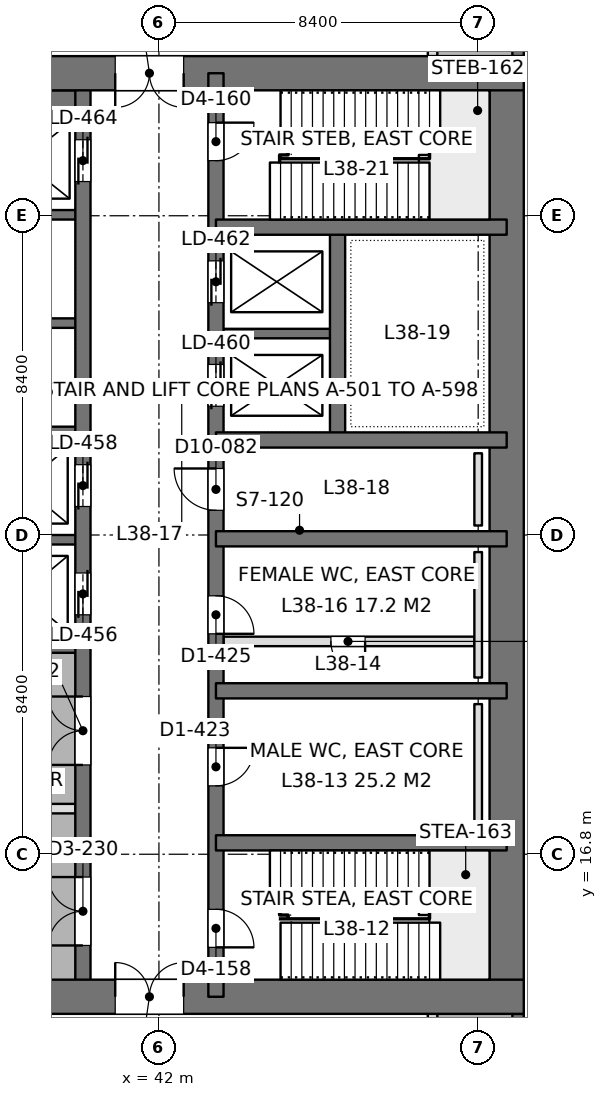
"""IFC4 building model, lengths in metres.
Left out: names, types, materials, properties, quantities, classifications, styles, units other than length and angle.
Written with IfcOpenShell. Run it as: python <this file> out.ifc"""

import sys

from ifc_helpers import new_model, si_unit, direction, frame, frame_2d, origin, place, context, subcontext, project, spatial, rectangle, extrude, element, fill, save


model = new_model("IFC4")
c1 = context("Model", 3, precision=1e-05, world=origin(), true_north=direction((0.0, 1.0)))
c2 = subcontext(c1, "Body", "Model", "MODEL_VIEW")
j1 = project(units=[si_unit("LENGTHUNIT", "METRE"), si_unit("PLANEANGLEUNIT", "RADIAN")], contexts=[c1])
p1 = place(None, origin())
s1 = spatial("IfcSite", under=j1, at=p1, CompositionType="ELEMENT")
p2 = place(p1, origin())
s2 = spatial("IfcBuilding", under=s1, at=p2, CompositionType="ELEMENT")
p3 = place(p2, frame((0.0, 0.0, 168.0)))
s3 = spatial("IfcBuildingStorey", under=s2, at=p3, CompositionType="ELEMENT", Elevation=168.0)
p4 = place(p3, frame((33.6, 13.05, 0.0), z_axis=(0.0, 0.0, 1.0), x_axis=(1.0, 0.0, 0.0)))
e1 = element("IfcWall", 1, at=p4, inside=s3, PredefinedType="SHEAR", context=c2, shape_type="SweptSolid", body=[
    extrude(rectangle(XDim=18.0, YDim=0.9, at=frame_2d((9.0, 0.0))), origin(), (0.0, 0.0, 1.0), 5.4),
])
p5 = place(p4, frame((7.25, 0.0, 0.0)))
e2 = element("IfcOpeningElement", 2, at=p5, cuts=e1, PredefinedType="OPENING", context=c2, shape_type="SweptSolid", body=[
    extrude(rectangle(XDim=1.8, YDim=2.4, at=frame_2d((0.9, 1.2))), frame((0.0, 0.46, 0.0), z_axis=(0.0, -1.0, 0.0), x_axis=(1.0, 0.0, 0.0)), (0.0, 0.0, 1.0), 0.92),
])
p6 = place(p3, frame((33.6, 37.35, 0.0), z_axis=(0.0, 0.0, 1.0), x_axis=(1.0, 0.0, 0.0)))
e3 = element("IfcWall", 3, at=p6, inside=s3, PredefinedType="SHEAR", context=c2, shape_type="SweptSolid", body=[
    extrude(rectangle(XDim=18.0, YDim=0.9, at=frame_2d((9.0, 0.0))), origin(), (0.0, 0.0, 1.0), 5.4),
])
p7 = place(p6, frame((7.25, 0.0, 0.0)))
e4 = element("IfcOpeningElement", 4, at=p7, cuts=e3, PredefinedType="OPENING", context=c2, shape_type="SweptSolid", body=[
    extrude(rectangle(XDim=1.8, YDim=2.4, at=frame_2d((0.9, 1.2))), frame((0.0, 0.46, 0.0), z_axis=(0.0, -1.0, 0.0), x_axis=(1.0, 0.0, 0.0)), (0.0, 0.0, 1.0), 0.92),
])
p8 = place(p3, frame((51.15, 13.05, 0.0), z_axis=(0.0, 0.0, 1.0), x_axis=(0.0, 1.0, 0.0)))
e5 = element("IfcWall", 5, at=p8, inside=s3, PredefinedType="SHEAR", context=c2, shape_type="SweptSolid", body=[
    extrude(rectangle(XDim=24.3, YDim=0.9, at=frame_2d((12.15, 0.0))), origin(), (0.0, 0.0, 1.0), 5.4),
])
p9 = place(p3, frame((43.5, 13.05, 0.0), z_axis=(0.0, 0.0, 1.0), x_axis=(0.0, 1.0, 0.0)))
e6 = element("IfcWall", 6, at=p9, inside=s3, PredefinedType="SHEAR", context=c2, shape_type="SweptSolid", body=[
    extrude(rectangle(XDim=24.3, YDim=0.4, at=frame_2d((12.15, 0.0))), origin(), (0.0, 0.0, 1.0), 5.4),
])
p10 = place(p9, frame((1.3, 0.0, 0.0)))
e7 = element("IfcOpeningElement", 7, at=p10, cuts=e6, PredefinedType="OPENING", context=c2, shape_type="SweptSolid", body=[
    extrude(rectangle(XDim=1.0, YDim=2.2, at=frame_2d((0.5, 1.1))), frame((0.0, 0.21, 0.0), z_axis=(0.0, -1.0, 0.0), x_axis=(1.0, 0.0, 0.0)), (0.0, 0.0, 1.0), 0.42),
])
p11 = place(p9, frame((22.0, 0.0, 0.0)))
e8 = element("IfcOpeningElement", 8, at=p11, cuts=e6, PredefinedType="OPENING", context=c2, shape_type="SweptSolid", body=[
    extrude(rectangle(XDim=1.0, YDim=2.2, at=frame_2d((0.5, 1.1))), frame((0.0, 0.21, 0.0), z_axis=(0.0, -1.0, 0.0), x_axis=(1.0, 0.0, 0.0)), (0.0, 0.0, 1.0), 0.42),
])
p12 = place(p9, frame((5.55, 0.0, 0.0)))
e9 = element("IfcOpeningElement", 9, at=p12, cuts=e6, PredefinedType="OPENING", context=c2, shape_type="SweptSolid", body=[
    extrude(rectangle(XDim=1.0, YDim=2.2, at=frame_2d((0.5, 1.1))), frame((0.0, 0.21, 0.0), z_axis=(0.0, -1.0, 0.0), x_axis=(1.0, 0.0, 0.0)), (0.0, 0.0, 1.0), 0.42),
])
p13 = place(p9, frame((9.55, 0.0, 0.0)))
e10 = element("IfcOpeningElement", 10, at=p13, cuts=e6, PredefinedType="OPENING", context=c2, shape_type="SweptSolid", body=[
    extrude(rectangle(XDim=1.0, YDim=2.2, at=frame_2d((0.5, 1.1))), frame((0.0, 0.21, 0.0), z_axis=(0.0, -1.0, 0.0), x_axis=(1.0, 0.0, 0.0)), (0.0, 0.0, 1.0), 0.42),
])
p14 = place(p9, frame((12.8, 0.0, 0.0)))
e11 = element("IfcOpeningElement", 11, at=p14, cuts=e6, PredefinedType="OPENING", context=c2, shape_type="SweptSolid", body=[
    extrude(rectangle(XDim=1.1, YDim=2.2, at=frame_2d((0.55, 1.1))), frame((0.0, 0.21, 0.0), z_axis=(0.0, -1.0, 0.0), x_axis=(1.0, 0.0, 0.0)), (0.0, 0.0, 1.0), 0.42),
])
p15 = place(p9, frame((15.538, 0.0, 0.0)))
e12 = element("IfcOpeningElement", 12, at=p15, cuts=e6, PredefinedType="OPENING", context=c2, shape_type="SweptSolid", body=[
    extrude(rectangle(XDim=1.1, YDim=2.2, at=frame_2d((0.55, 1.1))), frame((0.0, 0.21, 0.0), z_axis=(0.0, -1.0, 0.0), x_axis=(1.0, 0.0, 0.0)), (0.0, 0.0, 1.0), 0.42),
])
p16 = place(p9, frame((18.262, 0.0, 0.0)))
e13 = element("IfcOpeningElement", 13, at=p16, cuts=e6, PredefinedType="OPENING", context=c2, shape_type="SweptSolid", body=[
    extrude(rectangle(XDim=1.1, YDim=2.2, at=frame_2d((0.55, 1.1))), frame((0.0, 0.21, 0.0), z_axis=(0.0, -1.0, 0.0), x_axis=(1.0, 0.0, 0.0)), (0.0, 0.0, 1.0), 0.42),
])
p17 = place(p3, frame((40.0, 13.05, 0.0), z_axis=(0.0, 0.0, 1.0), x_axis=(0.0, 1.0, 0.0)))
e14 = element("IfcWall", 14, at=p17, inside=s3, PredefinedType="SHEAR", context=c2, shape_type="SweptSolid", body=[
    extrude(rectangle(XDim=24.3, YDim=0.4, at=frame_2d((12.15, 0.0))), origin(), (0.0, 0.0, 1.0), 5.4),
])
p18 = place(p17, frame((10.05, 0.0, 0.0)))
e15 = element("IfcOpeningElement", 15, at=p18, cuts=e14, PredefinedType="OPENING", context=c2, shape_type="SweptSolid", body=[
    extrude(rectangle(XDim=1.1, YDim=2.2, at=frame_2d((0.55, 1.1))), frame((0.0, 0.21, 0.0), z_axis=(0.0, -1.0, 0.0), x_axis=(1.0, 0.0, 0.0)), (0.0, 0.0, 1.0), 0.42),
])
p19 = place(p17, frame((12.9, 0.0, 0.0)))
e16 = element("IfcOpeningElement", 16, at=p19, cuts=e14, PredefinedType="OPENING", context=c2, shape_type="SweptSolid", body=[
    extrude(rectangle(XDim=1.1, YDim=2.2, at=frame_2d((0.55, 1.1))), frame((0.0, 0.21, 0.0), z_axis=(0.0, -1.0, 0.0), x_axis=(1.0, 0.0, 0.0)), (0.0, 0.0, 1.0), 0.42),
])
p20 = place(p17, frame((21.45, 0.0, 0.0)))
e17 = element("IfcOpeningElement", 17, at=p20, cuts=e14, PredefinedType="OPENING", context=c2, shape_type="SweptSolid", body=[
    extrude(rectangle(XDim=1.1, YDim=2.2, at=frame_2d((0.55, 1.1))), frame((0.0, 0.21, 0.0), z_axis=(0.0, -1.0, 0.0), x_axis=(1.0, 0.0, 0.0)), (0.0, 0.0, 1.0), 0.42),
])
p21 = place(p17, frame((6.1, 0.0, 0.0)))
e18 = element("IfcOpeningElement", 18, at=p21, cuts=e14, PredefinedType="OPENING", context=c2, shape_type="SweptSolid", body=[
    extrude(rectangle(XDim=1.8, YDim=2.4, at=frame_2d((0.9, 1.2))), frame((0.0, 0.21, 0.0), z_axis=(0.0, -1.0, 0.0), x_axis=(1.0, 0.0, 0.0)), (0.0, 0.0, 1.0), 0.42),
])
p22 = place(p17, frame((1.35, 0.0, 0.0)))
e19 = element("IfcOpeningElement", 19, at=p22, cuts=e14, PredefinedType="OPENING", context=c2, shape_type="SweptSolid", body=[
    extrude(rectangle(XDim=1.8, YDim=2.4, at=frame_2d((0.9, 1.2))), frame((0.0, 0.21, 0.0), z_axis=(0.0, -1.0, 0.0), x_axis=(1.0, 0.0, 0.0)), (0.0, 0.0, 1.0), 0.42),
])
for number, where, z_axis, x_axis in (
    (20, (51.15, 17.1, 0.0), (0.0, 0.0, 1.0), (-1.0, 0.0, 0.0)),
    (21, (51.15, 21.1, 0.0), (0.0, 0.0, 1.0), (-1.0, 0.0, 0.0)),
    (22, (51.15, 25.1, 0.0), (0.0, 0.0, 1.0), (-1.0, 0.0, 0.0)),
    (23, (51.15, 27.7, 0.0), (0.0, 0.0, 1.0), (-1.0, 0.0, 0.0)),
    (24, (51.15, 33.3, 0.0), (0.0, 0.0, 1.0), (-1.0, 0.0, 0.0)),
):
    element("IfcWall", number, at=place(p3, frame(where, z_axis=z_axis, x_axis=x_axis)), inside=s3, PredefinedType="SHEAR", context=c2, shape_type="SweptSolid", body=[
        extrude(rectangle(XDim=7.65, YDim=0.4, at=frame_2d((3.825, 0.0))), origin(), (0.0, 0.0, 1.0), 5.4),
    ])
p23 = place(p3, frame((46.7, 27.7, 0.0), z_axis=(0.0, 0.0, 1.0), x_axis=(0.0, 1.0, 0.0)))
e25 = element("IfcWall", 25, at=p23, inside=s3, PredefinedType="SHEAR", context=c2, shape_type="SweptSolid", body=[
    extrude(rectangle(XDim=5.6, YDim=0.4, at=frame_2d((2.8, 0.0))), origin(), (0.0, 0.0, 1.0), 5.4),
])
p24 = place(p3, frame((46.7, 30.5, 0.0), z_axis=(0.0, 0.0, 1.0), x_axis=(-1.0, 0.0, 0.0)))
e26 = element("IfcWall", 26, at=p24, inside=s3, PredefinedType="SHEAR", context=c2, shape_type="SweptSolid", body=[
    extrude(rectangle(XDim=3.2, YDim=0.25, at=frame_2d((1.6, 0.0))), origin(), (0.0, 0.0, 1.0), 5.4),
])
p25 = place(p3, frame((40.0, 22.225, 0.0), z_axis=(0.0, 0.0, 1.0), x_axis=(-1.0, 0.0, 0.0)))
e27 = element("IfcWall", 27, at=p25, inside=s3, PredefinedType="SHEAR", context=c2, shape_type="SweptSolid", body=[
    extrude(rectangle(XDim=5.95, YDim=0.25, at=frame_2d((2.975, 0.0))), origin(), (0.0, 0.0, 1.0), 5.4),
])
for number, where, z_axis, x_axis in (
    (28, (40.0, 25.075, 0.0), (0.0, 0.0, 1.0), (-1.0, 0.0, 0.0)),
    (29, (40.0, 27.925, 0.0), (0.0, 0.0, 1.0), (-1.0, 0.0, 0.0)),
    (30, (40.0, 30.775, 0.0), (0.0, 0.0, 1.0), (-1.0, 0.0, 0.0)),
    (31, (40.0, 33.625, 0.0), (0.0, 0.0, 1.0), (-1.0, 0.0, 0.0)),
):
    element("IfcWall", number, at=place(p3, frame(where, z_axis=z_axis, x_axis=x_axis)), inside=s3, PredefinedType="SHEAR", context=c2, shape_type="SweptSolid", body=[
        extrude(rectangle(XDim=3.2, YDim=0.25, at=frame_2d((1.6, 0.0))), origin(), (0.0, 0.0, 1.0), 5.4),
    ])
p26 = place(p3, frame((40.0, 36.625, 0.0), z_axis=(0.0, 0.0, 1.0), x_axis=(-1.0, 0.0, 0.0)))
e32 = element("IfcWall", 32, at=p26, inside=s3, PredefinedType="SHEAR", context=c2, shape_type="SweptSolid", body=[
    extrude(rectangle(XDim=3.2, YDim=0.55, at=frame_2d((1.6, 0.0))), origin(), (0.0, 0.0, 1.0), 5.4),
])
p27 = place(p3, frame((51.45, 42.0, 0.0), z_axis=(0.0, 0.0, 1.0), x_axis=(0.0, -1.0, 0.0)))
e33 = element("IfcWall", 33, at=p27, inside=s3, PredefinedType="SOLIDWALL", context=c2, shape_type="SweptSolid", body=[
    extrude(rectangle(XDim=4.2, YDim=0.3, at=frame_2d((2.1, 0.0))), origin(), (0.0, 0.0, 1.0), 5.25),
])
p28 = place(p27, frame((0.9, 0.0, 1.2)))
e34 = element("IfcOpeningElement", 34, at=p28, cuts=e33, PredefinedType="OPENING", context=c2, shape_type="SweptSolid", body=[
    extrude(rectangle(XDim=2.4, YDim=2.4, at=frame_2d((1.2, 1.2))), frame((0.0, 0.16, 0.0), z_axis=(0.0, -1.0, 0.0), x_axis=(1.0, 0.0, 0.0)), (0.0, 0.0, 1.0), 0.32),
])
p29 = place(p3, frame((51.45, 12.6, 0.0), z_axis=(0.0, 0.0, 1.0), x_axis=(0.0, -1.0, 0.0)))
e35 = element("IfcWall", 35, at=p29, inside=s3, PredefinedType="SOLIDWALL", context=c2, shape_type="SweptSolid", body=[
    extrude(rectangle(XDim=4.2, YDim=0.3, at=frame_2d((2.1, 0.0))), origin(), (0.0, 0.0, 1.0), 5.25),
])
p30 = place(p29, frame((0.9, 0.0, 1.2)))
e36 = element("IfcOpeningElement", 36, at=p30, cuts=e35, PredefinedType="OPENING", context=c2, shape_type="SweptSolid", body=[
    extrude(rectangle(XDim=2.4, YDim=2.4, at=frame_2d((1.2, 1.2))), frame((0.0, 0.16, 0.0), z_axis=(0.0, -1.0, 0.0), x_axis=(1.0, 0.0, 0.0)), (0.0, 0.0, 1.0), 0.32),
])
p31 = place(p3, frame((33.898, 18.0, 0.0), z_axis=(0.0, 0.0, 1.0), x_axis=(1.0, 0.0, 0.0)))
e37 = element("IfcWall", 37, at=p31, inside=s3, PredefinedType="PARTITIONING", context=c2, shape_type="SweptSolid", body=[
    extrude(rectangle(XDim=5.904, YDim=0.25, at=frame_2d((2.952, 0.0))), origin(), (0.0, 0.0, 1.0), 4.75),
])
p32 = place(p3, frame((49.2, 10.8, 0.0), z_axis=(0.0, 0.0, 1.0), x_axis=(0.0, 1.0, 0.0)))
e38 = element("IfcWall", 38, at=p32, inside=s3, PredefinedType="PARTITIONING", context=c2, shape_type="SweptSolid", body=[
    extrude(rectangle(XDim=1.802, YDim=0.25, at=frame_2d((0.901, 0.0))), origin(), (0.0, 0.0, 1.0), 5.25),
])
p33 = place(p3, frame((49.2, 37.8, 0.0), z_axis=(0.0, 0.0, 1.0), x_axis=(0.0, 1.0, 0.0)))
e39 = element("IfcWall", 39, at=p33, inside=s3, PredefinedType="PARTITIONING", context=c2, shape_type="SweptSolid", body=[
    extrude(rectangle(XDim=1.8, YDim=0.25, at=frame_2d((0.9, 0.0))), origin(), (0.0, 0.0, 1.0), 5.25),
])
p34 = place(p3, frame((43.7, 22.4, 0.0), z_axis=(0.0, 0.0, 1.0), x_axis=(1.0, 0.0, 0.0)))
e40 = element("IfcWall", 40, at=p34, inside=s3, PredefinedType="PARTITIONING", context=c2, shape_type="SweptSolid", body=[
    extrude(rectangle(XDim=6.6, YDim=0.25, at=frame_2d((3.3, 0.0))), origin(), (0.0, 0.0, 1.0), 5.2),
])
p35 = place(p34, frame((2.825, 0.0, 0.0)))
e41 = element("IfcOpeningElement", 41, at=p35, cuts=e40, PredefinedType="OPENING", context=c2, shape_type="SweptSolid", body=[
    extrude(rectangle(XDim=0.9, YDim=2.2, at=frame_2d((0.45, 1.1))), frame((0.0, 0.135, 0.0), z_axis=(0.0, -1.0, 0.0), x_axis=(1.0, 0.0, 0.0)), (0.0, 0.0, 1.0), 0.27),
])
for number, where, z_axis, x_axis in (
    (42, (50.4, 17.45, 0.0), (0.0, 0.0, 1.0), (0.0, 1.0, 0.0)),
    (43, (50.4, 21.45, 0.0), (0.0, 0.0, 1.0), (0.0, 1.0, 0.0)),
):
    element("IfcWall", number, at=place(p3, frame(where, z_axis=z_axis, x_axis=x_axis)), inside=s3, PredefinedType="PLUMBINGWALL", context=c2, shape_type="SweptSolid", body=[
        extrude(rectangle(XDim=3.3, YDim=0.2, at=frame_2d((1.65, 0.0))), origin(), (0.0, 0.0, 1.0), 1.2),
    ])
p36 = place(p3, frame((50.4, 25.45, 0.0), z_axis=(0.0, 0.0, 1.0), x_axis=(0.0, 1.0, 0.0)))
e44 = element("IfcWall", 44, at=p36, inside=s3, PredefinedType="PLUMBINGWALL", context=c2, shape_type="SweptSolid", body=[
    extrude(rectangle(XDim=1.9, YDim=0.2, at=frame_2d((0.95, 0.0))), origin(), (0.0, 0.0, 1.0), 1.2),
])
p37 = place(p5, origin())
e45 = element("IfcDoor", 45, at=p37, inside=s3, OperationType="DOUBLE_DOOR_SINGLE_SWING", PredefinedType="DOOR", context=c2, shape_type="SweptSolid", body=[
    extrude(rectangle(XDim=1.8, YDim=2.4, at=frame_2d((0.9, 1.2))), frame((0.0, 0.025, 0.0), z_axis=(0.0, -1.0, 0.0), x_axis=(1.0, 0.0, 0.0)), (0.0, 0.0, 1.0), 0.05),
])
fill(e2, e45)
p38 = place(p7, frame((1.8, 0.0, 0.0), z_axis=(0.0, 0.0, 1.0), x_axis=(-1.0, 0.0, 0.0)))
e46 = element("IfcDoor", 46, at=p38, inside=s3, OperationType="DOUBLE_DOOR_SINGLE_SWING", PredefinedType="DOOR", context=c2, shape_type="SweptSolid", body=[
    extrude(rectangle(XDim=1.8, YDim=2.4, at=frame_2d((0.9, 1.2))), frame((0.0, 0.025, 0.0), z_axis=(0.0, -1.0, 0.0), x_axis=(1.0, 0.0, 0.0)), (0.0, 0.0, 1.0), 0.05),
])
fill(e4, e46)
p39 = place(p10, frame((1.0, 0.0, 0.0), z_axis=(0.0, 0.0, 1.0), x_axis=(-1.0, 0.0, 0.0)))
e47 = element("IfcDoor", 47, at=p39, inside=s3, OperationType="SINGLE_SWING_RIGHT", PredefinedType="DOOR", context=c2, shape_type="SweptSolid", body=[
    extrude(rectangle(XDim=1.0, YDim=2.2, at=frame_2d((0.5, 1.1))), frame((0.0, 0.025, 0.0), z_axis=(0.0, -1.0, 0.0), x_axis=(1.0, 0.0, 0.0)), (0.0, 0.0, 1.0), 0.05),
])
fill(e7, e47)
p40 = place(p11, frame((1.0, 0.0, 0.0), z_axis=(0.0, 0.0, 1.0), x_axis=(-1.0, 0.0, 0.0)))
e48 = element("IfcDoor", 48, at=p40, inside=s3, OperationType="SINGLE_SWING_LEFT", PredefinedType="DOOR", context=c2, shape_type="SweptSolid", body=[
    extrude(rectangle(XDim=1.0, YDim=2.2, at=frame_2d((0.5, 1.1))), frame((0.0, 0.025, 0.0), z_axis=(0.0, -1.0, 0.0), x_axis=(1.0, 0.0, 0.0)), (0.0, 0.0, 1.0), 0.05),
])
fill(e8, e48)
p41 = place(p12, frame((1.0, 0.0, 0.0), z_axis=(0.0, 0.0, 1.0), x_axis=(-1.0, 0.0, 0.0)))
e49 = element("IfcDoor", 49, at=p41, inside=s3, OperationType="SINGLE_SWING_LEFT", PredefinedType="DOOR", context=c2, shape_type="SweptSolid", body=[
    extrude(rectangle(XDim=1.0, YDim=2.2, at=frame_2d((0.5, 1.1))), frame((0.0, 0.025, 0.0), z_axis=(0.0, -1.0, 0.0), x_axis=(1.0, 0.0, 0.0)), (0.0, 0.0, 1.0), 0.05),
])
fill(e9, e49)
p42 = place(p13, frame((1.0, 0.0, 0.0), z_axis=(0.0, 0.0, 1.0), x_axis=(-1.0, 0.0, 0.0)))
e50 = element("IfcDoor", 50, at=p42, inside=s3, OperationType="SINGLE_SWING_RIGHT", PredefinedType="DOOR", context=c2, shape_type="SweptSolid", body=[
    extrude(rectangle(XDim=1.0, YDim=2.2, at=frame_2d((0.5, 1.1))), frame((0.0, 0.025, 0.0), z_axis=(0.0, -1.0, 0.0), x_axis=(1.0, 0.0, 0.0)), (0.0, 0.0, 1.0), 0.05),
])
fill(e10, e50)
p43 = place(p14, origin())
e51 = element("IfcDoor", 51, at=p43, inside=s3, OperationType="SINGLE_SWING_RIGHT", PredefinedType="DOOR", context=c2, shape_type="SweptSolid", body=[
    extrude(rectangle(XDim=1.1, YDim=2.2, at=frame_2d((0.55, 1.1))), frame((0.0, 0.025, 0.0), z_axis=(0.0, -1.0, 0.0), x_axis=(1.0, 0.0, 0.0)), (0.0, 0.0, 1.0), 0.05),
])
fill(e11, e51)
p44 = place(p18, origin())
e52 = element("IfcDoor", 52, at=p44, inside=s3, OperationType="DOUBLE_DOOR_SLIDING", PredefinedType="DOOR", context=c2, shape_type="SweptSolid", body=[
    extrude(rectangle(XDim=1.1, YDim=2.2, at=frame_2d((0.55, 1.1))), frame((0.0, 0.025, 0.0), z_axis=(0.0, -1.0, 0.0), x_axis=(1.0, 0.0, 0.0)), (0.0, 0.0, 1.0), 0.05),
])
fill(e15, e52)
p45 = place(p19, origin())
e53 = element("IfcDoor", 53, at=p45, inside=s3, OperationType="DOUBLE_DOOR_SLIDING", PredefinedType="DOOR", context=c2, shape_type="SweptSolid", body=[
    extrude(rectangle(XDim=1.1, YDim=2.2, at=frame_2d((0.55, 1.1))), frame((0.0, 0.025, 0.0), z_axis=(0.0, -1.0, 0.0), x_axis=(1.0, 0.0, 0.0)), (0.0, 0.0, 1.0), 0.05),
])
fill(e16, e53)
p46 = place(p20, origin())
e54 = element("IfcDoor", 54, at=p46, inside=s3, OperationType="DOUBLE_DOOR_SLIDING", PredefinedType="DOOR", context=c2, shape_type="SweptSolid", body=[
    extrude(rectangle(XDim=1.1, YDim=2.2, at=frame_2d((0.55, 1.1))), frame((0.0, 0.025, 0.0), z_axis=(0.0, -1.0, 0.0), x_axis=(1.0, 0.0, 0.0)), (0.0, 0.0, 1.0), 0.05),
])
fill(e17, e54)
p47 = place(p15, origin())
e55 = element("IfcDoor", 55, at=p47, inside=s3, OperationType="DOUBLE_DOOR_SLIDING", PredefinedType="DOOR", context=c2, shape_type="SweptSolid", body=[
    extrude(rectangle(XDim=1.1, YDim=2.2, at=frame_2d((0.55, 1.1))), frame((0.0, 0.025, 0.0), z_axis=(0.0, -1.0, 0.0), x_axis=(1.0, 0.0, 0.0)), (0.0, 0.0, 1.0), 0.05),
])
fill(e12, e55)
p48 = place(p16, origin())
e56 = element("IfcDoor", 56, at=p48, inside=s3, OperationType="DOUBLE_DOOR_SLIDING", PredefinedType="DOOR", context=c2, shape_type="SweptSolid", body=[
    extrude(rectangle(XDim=1.1, YDim=2.2, at=frame_2d((0.55, 1.1))), frame((0.0, 0.025, 0.0), z_axis=(0.0, -1.0, 0.0), x_axis=(1.0, 0.0, 0.0)), (0.0, 0.0, 1.0), 0.05),
])
fill(e13, e56)
p49 = place(p21, origin())
e57 = element("IfcDoor", 57, at=p49, inside=s3, OperationType="DOUBLE_DOOR_SINGLE_SWING", PredefinedType="DOOR", context=c2, shape_type="SweptSolid", body=[
    extrude(rectangle(XDim=1.8, YDim=2.4, at=frame_2d((0.9, 1.2))), frame((0.0, 0.025, 0.0), z_axis=(0.0, -1.0, 0.0), x_axis=(1.0, 0.0, 0.0)), (0.0, 0.0, 1.0), 0.05),
])
fill(e18, e57)
p50 = place(p22, origin())
e58 = element("IfcDoor", 58, at=p50, inside=s3, OperationType="DOUBLE_DOOR_SINGLE_SWING", PredefinedType="DOOR", context=c2, shape_type="SweptSolid", body=[
    extrude(rectangle(XDim=1.8, YDim=2.4, at=frame_2d((0.9, 1.2))), frame((0.0, 0.025, 0.0), z_axis=(0.0, -1.0, 0.0), x_axis=(1.0, 0.0, 0.0)), (0.0, 0.0, 1.0), 0.05),
])
fill(e19, e58)
p51 = place(p35, frame((0.9, 0.0, 0.0), z_axis=(0.0, 0.0, 1.0), x_axis=(-1.0, 0.0, 0.0)))
e59 = element("IfcDoor", 59, at=p51, inside=s3, OperationType="SINGLE_SWING_LEFT", PredefinedType="DOOR", context=c2, shape_type="SweptSolid", body=[
    extrude(rectangle(XDim=0.9, YDim=2.2, at=frame_2d((0.45, 1.1))), frame((0.0, 0.025, 0.0), z_axis=(0.0, -1.0, 0.0), x_axis=(1.0, 0.0, 0.0)), (0.0, 0.0, 1.0), 0.05),
])
fill(e41, e59)
save(model, sys.argv[1])
